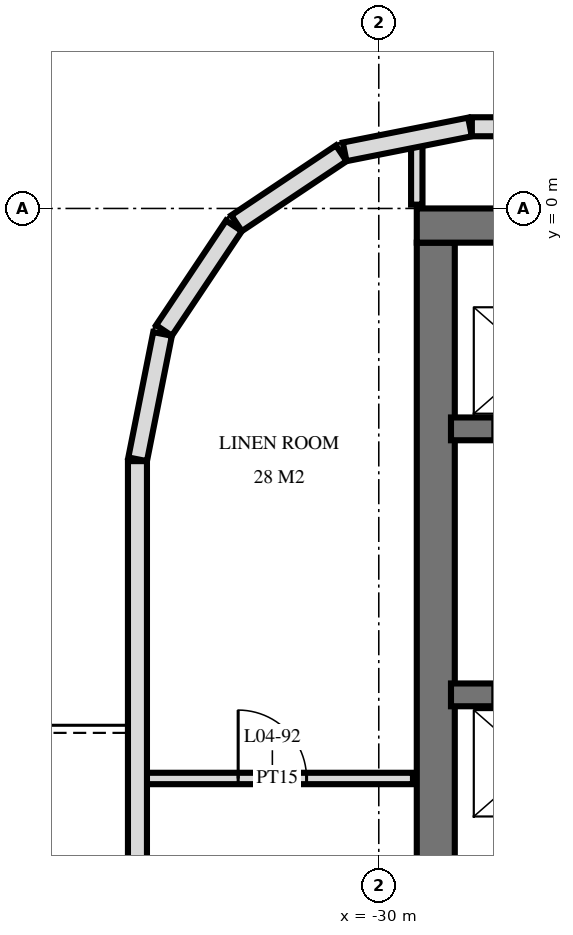
"""IFC4 building model, lengths in metres.
Left out: names, types, materials, properties, quantities, classifications, styles, units other than length and angle.
Written with IfcOpenShell. Run it as: python <this file> out.ifc"""

import sys

from ifc_helpers import new_model, si_unit, direction, frame, frame_2d, origin, place, context, subcontext, project, spatial, rectangle, extrude, element, fill, save


model = new_model("IFC4")
c1 = context("Model", 3, precision=1e-05, world=origin(), true_north=direction((0.0, 1.0)))
c2 = subcontext(c1, "Body", "Model", "MODEL_VIEW")
j1 = project(units=[si_unit("LENGTHUNIT", "METRE"), si_unit("PLANEANGLEUNIT", "RADIAN")], contexts=[c1])
p1 = place(None, origin())
s1 = spatial("IfcSite", under=j1, at=p1, CompositionType="ELEMENT")
p2 = place(p1, origin())
s2 = spatial("IfcBuilding", under=s1, at=p2, CompositionType="ELEMENT")
p3 = place(p2, frame((0.0, 0.0, 24.0)))
s3 = spatial("IfcBuildingStorey", under=s2, at=p3, CompositionType="ELEMENT", Elevation=24.0)
p4 = place(p3, frame((-29.5, -0.225, 0.0), z_axis=(0.0, 0.0, 1.0), x_axis=(1.0, 0.0, 0.0)))
e1 = element("IfcWall", 1, at=p4, inside=s3, PredefinedType="SHEAR", context=c2, shape_type="SweptSolid", body=[
    extrude(rectangle(XDim=19.5, YDim=0.45, at=frame_2d((9.75, 0.0))), origin(), (0.0, 0.0, 1.0), 3.6),
])
p5 = place(p3, frame((-29.25, -14.55, 0.0), z_axis=(0.0, 0.0, 1.0), x_axis=(0.0, 1.0, 0.0)))
e2 = element("IfcWall", 2, at=p5, inside=s3, PredefinedType="SHEAR", context=c2, shape_type="SweptSolid", body=[
    extrude(rectangle(XDim=14.1, YDim=0.5, at=frame_2d((7.05, 0.0))), origin(), (0.0, 0.0, 1.0), 3.6),
])
p6 = place(p3, frame((-29.05, -2.9, 0.0), z_axis=(0.0, 0.0, 1.0), x_axis=(1.0, 0.0, 0.0)))
e3 = element("IfcWall", 3, at=p6, inside=s3, PredefinedType="SHEAR", context=c2, shape_type="SweptSolid", body=[
    extrude(rectangle(XDim=18.7, YDim=0.3, at=frame_2d((9.35, 0.0))), origin(), (0.0, 0.0, 1.0), 3.6),
])
p7 = place(p6, frame((2.95, 0.0, 0.0)))
e4 = element("IfcOpeningElement", 4, at=p7, cuts=e3, PredefinedType="OPENING", context=c2, shape_type="SweptSolid", body=[
    extrude(rectangle(XDim=1.1, YDim=2.1, at=frame_2d((0.55, 1.05))), frame((0.0, 0.16, 0.0), z_axis=(0.0, -1.0, 0.0), x_axis=(1.0, 0.0, 0.0)), (0.0, 0.0, 1.0), 0.32),
])
p8 = place(p6, frame((0.55, 0.0, 0.0)))
e5 = element("IfcOpeningElement", 5, at=p8, cuts=e3, PredefinedType="OPENING", context=c2, shape_type="SweptSolid", body=[
    extrude(rectangle(XDim=1.1, YDim=2.1, at=frame_2d((0.55, 1.05))), frame((0.0, 0.16, 0.0), z_axis=(0.0, -1.0, 0.0), x_axis=(1.0, 0.0, 0.0)), (0.0, 0.0, 1.0), 0.32),
])
p9 = place(p6, frame((11.613, 0.0, 0.0)))
e6 = element("IfcOpeningElement", 6, at=p9, cuts=e3, PredefinedType="OPENING", context=c2, shape_type="SweptSolid", body=[
    extrude(rectangle(XDim=0.9, YDim=2.1, at=frame_2d((0.45, 1.05))), frame((0.0, 0.16, 0.0), z_axis=(0.0, -1.0, 0.0), x_axis=(1.0, 0.0, 0.0)), (0.0, 0.0, 1.0), 0.32),
])
p10 = place(p6, frame((10.188, 0.0, 0.0)))
e7 = element("IfcOpeningElement", 7, at=p10, cuts=e3, PredefinedType="OPENING", context=c2, shape_type="SweptSolid", body=[
    extrude(rectangle(XDim=0.9, YDim=2.1, at=frame_2d((0.45, 1.05))), frame((0.0, 0.16, 0.0), z_axis=(0.0, -1.0, 0.0), x_axis=(1.0, 0.0, 0.0)), (0.0, 0.0, 1.0), 0.32),
])
p11 = place(p6, frame((17.562, 0.0, 0.0)))
e8 = element("IfcOpeningElement", 8, at=p11, cuts=e3, PredefinedType="OPENING", context=c2, shape_type="SweptSolid", body=[
    extrude(rectangle(XDim=1.0, YDim=2.1, at=frame_2d((0.5, 1.05))), frame((0.0, 0.16, 0.0), z_axis=(0.0, -1.0, 0.0), x_axis=(1.0, 0.0, 0.0)), (0.0, 0.0, 1.0), 0.32),
])
p12 = place(p6, frame((16.137, 0.0, 0.0)))
e9 = element("IfcOpeningElement", 9, at=p12, cuts=e3, PredefinedType="OPENING", context=c2, shape_type="SweptSolid", body=[
    extrude(rectangle(XDim=1.0, YDim=2.1, at=frame_2d((0.5, 1.05))), frame((0.0, 0.16, 0.0), z_axis=(0.0, -1.0, 0.0), x_axis=(1.0, 0.0, 0.0)), (0.0, 0.0, 1.0), 0.32),
])
p13 = place(p6, frame((13.85, 0.0, 0.0)))
e10 = element("IfcOpeningElement", 10, at=p13, cuts=e3, PredefinedType="OPENING", context=c2, shape_type="SweptSolid", body=[
    extrude(rectangle(XDim=1.0, YDim=2.1, at=frame_2d((0.5, 1.05))), frame((0.0, 0.16, 0.0), z_axis=(0.0, -1.0, 0.0), x_axis=(1.0, 0.0, 0.0)), (0.0, 0.0, 1.0), 0.32),
])
p14 = place(p6, frame((5.6, 0.0, 0.0)))
e11 = element("IfcOpeningElement", 11, at=p14, cuts=e3, PredefinedType="OPENING", context=c2, shape_type="SweptSolid", body=[
    extrude(rectangle(XDim=1.0, YDim=2.1, at=frame_2d((0.5, 1.05))), frame((0.0, 0.16, 0.0), z_axis=(0.0, -1.0, 0.0), x_axis=(1.0, 0.0, 0.0)), (0.0, 0.0, 1.0), 0.32),
])
p15 = place(p3, frame((-29.05, -6.4, 0.0), z_axis=(0.0, 0.0, 1.0), x_axis=(1.0, 0.0, 0.0)))
e12 = element("IfcWall", 12, at=p15, inside=s3, PredefinedType="SHEAR", context=c2, shape_type="SweptSolid", body=[
    extrude(rectangle(XDim=18.7, YDim=0.3, at=frame_2d((9.35, 0.0))), origin(), (0.0, 0.0, 1.0), 3.6),
])
p16 = place(p15, frame((2.95, 0.0, 0.0)))
e13 = element("IfcOpeningElement", 13, at=p16, cuts=e12, PredefinedType="OPENING", context=c2, shape_type="SweptSolid", body=[
    extrude(rectangle(XDim=1.1, YDim=2.1, at=frame_2d((0.55, 1.05))), frame((0.0, 0.16, 0.0), z_axis=(0.0, -1.0, 0.0), x_axis=(1.0, 0.0, 0.0)), (0.0, 0.0, 1.0), 0.32),
])
p17 = place(p15, frame((0.55, 0.0, 0.0)))
e14 = element("IfcOpeningElement", 14, at=p17, cuts=e12, PredefinedType="OPENING", context=c2, shape_type="SweptSolid", body=[
    extrude(rectangle(XDim=1.1, YDim=2.1, at=frame_2d((0.55, 1.05))), frame((0.0, 0.16, 0.0), z_axis=(0.0, -1.0, 0.0), x_axis=(1.0, 0.0, 0.0)), (0.0, 0.0, 1.0), 0.32),
])
p18 = place(p15, frame((10.8, 0.0, 0.0)))
e15 = element("IfcOpeningElement", 15, at=p18, cuts=e12, PredefinedType="OPENING", context=c2, shape_type="SweptSolid", body=[
    extrude(rectangle(XDim=1.1, YDim=2.1, at=frame_2d((0.55, 1.05))), frame((0.0, 0.16, 0.0), z_axis=(0.0, -1.0, 0.0), x_axis=(1.0, 0.0, 0.0)), (0.0, 0.0, 1.0), 0.32),
])
p19 = place(p15, frame((5.6, 0.0, 0.0)))
e16 = element("IfcOpeningElement", 16, at=p19, cuts=e12, PredefinedType="OPENING", context=c2, shape_type="SweptSolid", body=[
    extrude(rectangle(XDim=1.0, YDim=2.1, at=frame_2d((0.5, 1.05))), frame((0.0, 0.16, 0.0), z_axis=(0.0, -1.0, 0.0), x_axis=(1.0, 0.0, 0.0)), (0.0, 0.0, 1.0), 0.32),
])
p20 = place(p3, frame((28.775, 1.075, 0.0), z_axis=(0.0, 0.0, 1.0), x_axis=(-1.0, 0.0, 0.0)))
e17 = element("IfcWall", 17, at=p20, inside=s3, PredefinedType="SOLIDWALL", context=c2, shape_type="SweptSolid", body=[
    extrude(rectangle(XDim=57.551, YDim=0.25, at=frame_2d((28.775, 0.0))), origin(), (0.0, 0.0, 1.0), 3.32),
])
p21 = place(p20, frame((21.275, 0.0, 0.3)))
e18 = element("IfcOpeningElement", 18, at=p21, cuts=e17, PredefinedType="OPENING", context=c2, shape_type="SweptSolid", body=[
    extrude(rectangle(XDim=2.4, YDim=2.1, at=frame_2d((1.2, 1.05))), frame((0.0, 0.135, 0.0), z_axis=(0.0, -1.0, 0.0), x_axis=(1.0, 0.0, 0.0)), (0.0, 0.0, 1.0), 0.27),
])
p22 = place(p20, frame((27.275, 0.0, 0.3)))
e19 = element("IfcOpeningElement", 19, at=p22, cuts=e17, PredefinedType="OPENING", context=c2, shape_type="SweptSolid", body=[
    extrude(rectangle(XDim=2.4, YDim=2.1, at=frame_2d((1.2, 1.05))), frame((0.0, 0.135, 0.0), z_axis=(0.0, -1.0, 0.0), x_axis=(1.0, 0.0, 0.0)), (0.0, 0.0, 1.0), 0.27),
])
p23 = place(p20, frame((30.275, 0.0, 0.3)))
e20 = element("IfcOpeningElement", 20, at=p23, cuts=e17, PredefinedType="OPENING", context=c2, shape_type="SweptSolid", body=[
    extrude(rectangle(XDim=2.4, YDim=2.1, at=frame_2d((1.2, 1.05))), frame((0.0, 0.135, 0.0), z_axis=(0.0, -1.0, 0.0), x_axis=(1.0, 0.0, 0.0)), (0.0, 0.0, 1.0), 0.27),
])
p24 = place(p3, frame((-28.8, 1.073, 0.0), z_axis=(0.0, 0.0, 1.0), x_axis=(-0.980803419081, -0.194999110559, 0.0)))
e21 = element("IfcWall", 21, at=p24, inside=s3, PredefinedType="SOLIDWALL", context=c2, shape_type="SweptSolid", body=[
    extrude(rectangle(XDim=1.681, YDim=0.25, at=frame_2d((0.841, 0.0))), origin(), (0.0, 0.0, 1.0), 3.32),
])
for number, where, z_axis, x_axis in (
    (22, (-30.494, 0.726, 0.0), (0.0, 0.0, 1.0), (-0.831, -0.556, 0.0)),
    (23, (-31.906, -0.229, 0.0), (0.0, 0.0, 1.0), (-0.556, -0.831, 0.0)),
):
    element("IfcWall", number, at=place(p3, frame(where, z_axis=z_axis, x_axis=x_axis)), inside=s3, PredefinedType="SOLIDWALL", context=c2, shape_type="SweptSolid", body=[
        extrude(rectangle(XDim=1.656, YDim=0.25, at=frame_2d((0.828, 0.0))), origin(), (0.0, 0.0, 1.0), 3.32),
    ])
p25 = place(p3, frame((-32.844, -1.651, 0.0), z_axis=(0.0, 0.0, 1.0), x_axis=(-0.19513878023, -0.980775640221, 0.0)))
e24 = element("IfcWall", 24, at=p25, inside=s3, PredefinedType="SOLIDWALL", context=c2, shape_type="SweptSolid", body=[
    extrude(rectangle(XDim=1.681, YDim=0.25, at=frame_2d((0.841, 0.0))), origin(), (0.0, 0.0, 1.0), 3.32),
])
p26 = place(p3, frame((-33.175, -3.325, 0.0), z_axis=(0.0, 0.0, 1.0), x_axis=(0.0, -1.0, 0.0)))
e25 = element("IfcWall", 25, at=p26, inside=s3, PredefinedType="SOLIDWALL", context=c2, shape_type="SweptSolid", body=[
    extrude(rectangle(XDim=21.551, YDim=0.25, at=frame_2d((10.775, 0.0))), origin(), (0.0, 0.0, 1.0), 3.32),
])
p27 = place(p26, frame((7.025, 0.0, 0.0)))
e26 = element("IfcOpeningElement", 26, at=p27, cuts=e25, PredefinedType="OPENING", context=c2, shape_type="SweptSolid", body=[
    extrude(rectangle(XDim=1.8, YDim=2.4, at=frame_2d((0.9, 1.2))), frame((0.0, 0.135, 0.0), z_axis=(0.0, -1.0, 0.0), x_axis=(1.0, 0.0, 0.0)), (0.0, 0.0, 1.0), 0.27),
])
p28 = place(p26, frame((14.225, 0.0, 0.0)))
e27 = element("IfcOpeningElement", 27, at=p28, cuts=e25, PredefinedType="OPENING", context=c2, shape_type="SweptSolid", body=[
    extrude(rectangle(XDim=1.8, YDim=2.4, at=frame_2d((0.9, 1.2))), frame((0.0, 0.135, 0.0), z_axis=(0.0, -1.0, 0.0), x_axis=(1.0, 0.0, 0.0)), (0.0, 0.0, 1.0), 0.27),
])
p29 = place(p26, frame((18.875, 0.0, 0.0)))
e28 = element("IfcOpeningElement", 28, at=p29, cuts=e25, PredefinedType="OPENING", context=c2, shape_type="SweptSolid", body=[
    extrude(rectangle(XDim=1.8, YDim=2.4, at=frame_2d((0.9, 1.2))), frame((0.0, 0.135, 0.0), z_axis=(0.0, -1.0, 0.0), x_axis=(1.0, 0.0, 0.0)), (0.0, 0.0, 1.0), 0.27),
])
p30 = place(p3, frame((-29.5, 0.05, 0.0), z_axis=(0.0, 0.0, 1.0), x_axis=(0.0, 1.0, 0.0)))
e29 = element("IfcWall", 29, at=p30, inside=s3, PredefinedType="PARTITIONING", context=c2, shape_type="SweptSolid", body=[
    extrude(rectangle(XDim=0.827, YDim=0.15, at=frame_2d((0.414, 0.0))), origin(), (0.0, 0.0, 1.0), 3.32),
])
p31 = place(p3, frame((-33.12, -7.5, 0.0), z_axis=(0.0, 0.0, 1.0), x_axis=(1.0, 0.0, 0.0)))
e30 = element("IfcWall", 30, at=p31, inside=s3, PredefinedType="PARTITIONING", context=c2, shape_type="SweptSolid", body=[
    extrude(rectangle(XDim=3.57, YDim=0.15, at=frame_2d((1.785, 0.0))), origin(), (0.0, 0.0, 1.0), 3.32),
])
p32 = place(p31, frame((1.27, 0.0, 0.0)))
e31 = element("IfcOpeningElement", 31, at=p32, cuts=e30, PredefinedType="OPENING", context=c2, shape_type="SweptSolid", body=[
    extrude(rectangle(XDim=0.9, YDim=2.1, at=frame_2d((0.45, 1.05))), frame((0.0, 0.085, 0.0), z_axis=(0.0, -1.0, 0.0), x_axis=(1.0, 0.0, 0.0)), (0.0, 0.0, 1.0), 0.17),
])
p33 = place(p32, origin())
e32 = element("IfcDoor", 32, at=p33, inside=s3, OperationType="SINGLE_SWING_RIGHT", PredefinedType="DOOR", context=c2, shape_type="SweptSolid", body=[
    extrude(rectangle(XDim=0.9, YDim=2.1, at=frame_2d((0.45, 1.05))), frame((0.0, 0.025, 0.0), z_axis=(0.0, -1.0, 0.0), x_axis=(1.0, 0.0, 0.0)), (0.0, 0.0, 1.0), 0.05),
])
fill(e31, e32)
save(model, sys.argv[1])
